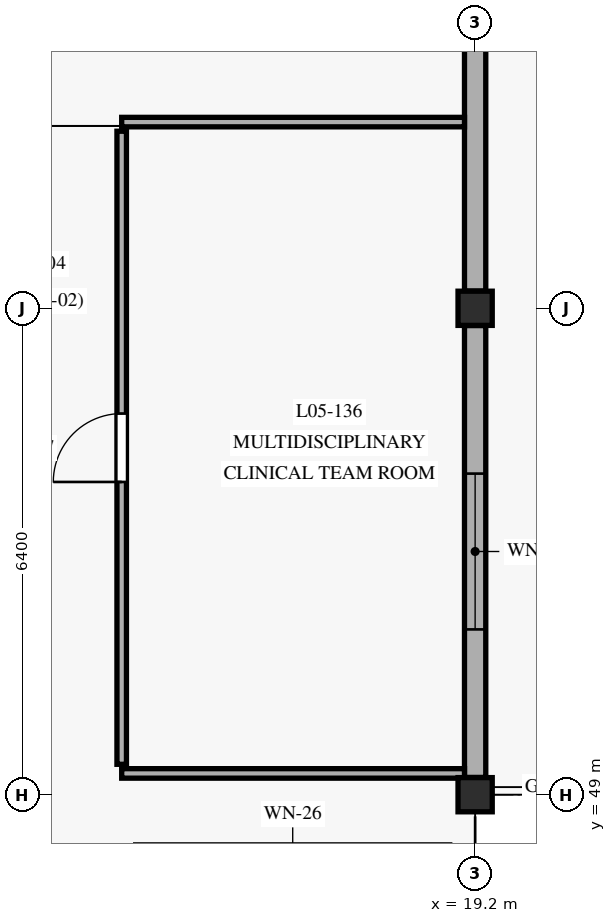
"""IFC4 building model, lengths in metres.
Left out: names, types, materials, properties, quantities, classifications, styles, units other than length and angle.
Written with IfcOpenShell. Run it as: python <this file> out.ifc"""

import sys

from ifc_helpers import new_model, si_unit, direction, frame, frame_2d, origin, origin_with_axes, origin_2d, place, context, subcontext, project, spatial, rectangle, extrude, element, fill, save


model = new_model("IFC4")
c1 = context("Model", 3, precision=1e-05, world=origin(), true_north=direction((0.0, 1.0)))
c2 = subcontext(c1, "Body", "Model", "MODEL_VIEW")
j1 = project(units=[si_unit("LENGTHUNIT", "METRE"), si_unit("PLANEANGLEUNIT", "RADIAN")], contexts=[c1])
p1 = place(None, origin())
s1 = spatial("IfcSite", under=j1, at=p1, CompositionType="ELEMENT")
p2 = place(p1, origin())
s2 = spatial("IfcBuilding", under=s1, at=p2, CompositionType="ELEMENT")
p3 = place(p2, frame((0.0, 0.0, 17.55)))
s3 = spatial("IfcBuildingStorey", under=s2, at=p3, CompositionType="ELEMENT", Elevation=17.55)
for number, where, z_axis, x_axis in (
    (1, (19.2, 49.0, 0.0), (0.0, 0.0, 1.0), (1.0, 0.0, 0.0)),
    (2, (19.2, 55.4, 0.0), (0.0, 0.0, 1.0), (1.0, 0.0, 0.0)),
):
    element("IfcColumn", number, at=place(p3, frame(where, z_axis=z_axis, x_axis=x_axis)), inside=s3, PredefinedType="COLUMN", context=c2, shape_type="SweptSolid", body=[
        extrude(rectangle(XDim=0.45, YDim=0.45, at=origin_2d()), origin(), (0.0, 0.0, 1.0), 4.05),
    ])
p4 = place(p3, frame((19.2, 49.227, 0.0), z_axis=(0.0, 0.0, 1.0), x_axis=(0.0, 1.0, 0.0)))
e3 = element("IfcWall", 3, at=p4, inside=s3, PredefinedType="SOLIDWALL", context=c2, shape_type="SweptSolid", body=[
    extrude(rectangle(XDim=5.946, YDim=0.28, at=frame_2d((2.973, 0.0))), origin(), (0.0, 0.0, 1.0), 3.39),
])
p5 = place(p4, frame((1.948, 0.0, 0.8)))
e4 = element("IfcOpeningElement", 4, at=p5, cuts=e3, PredefinedType="OPENING", context=c2, shape_type="SweptSolid", body=[
    extrude(rectangle(XDim=2.05, YDim=1.95, at=frame_2d((1.025, 0.975))), frame((0.0, 0.15, 0.0), z_axis=(0.0, -1.0, 0.0), x_axis=(1.0, 0.0, 0.0)), (0.0, 0.0, 1.0), 0.3),
])
p6 = place(p3, frame((19.2, 55.627, 0.0), z_axis=(0.0, 0.0, 1.0), x_axis=(0.0, 1.0, 0.0)))
e5 = element("IfcWall", 5, at=p6, inside=s3, PredefinedType="SOLIDWALL", context=c2, shape_type="SweptSolid", body=[
    extrude(rectangle(XDim=7.946, YDim=0.28, at=frame_2d((3.973, 0.0))), origin(), (0.0, 0.0, 1.0), 3.39),
])
p7 = place(p6, frame((3.403, 0.0, 0.0)))
e6 = element("IfcOpeningElement", 6, at=p7, cuts=e5, PredefinedType="OPENING", context=c2, shape_type="SweptSolid", body=[
    extrude(rectangle(XDim=1.14, YDim=2.3, at=frame_2d((0.57, 1.15))), frame((0.0, 0.15, 0.0), z_axis=(0.0, -1.0, 0.0), x_axis=(1.0, 0.0, 0.0)), (0.0, 0.0, 1.0), 0.3),
])
p8 = place(p3, frame((14.55, 49.4, 0.0), z_axis=(0.0, 0.0, 1.0), x_axis=(0.0, 1.0, 0.0)))
e7 = element("IfcWall", 7, at=p8, inside=s3, PredefinedType="PARTITIONING", context=c2, shape_type="SweptSolid", body=[
    extrude(rectangle(XDim=8.33, YDim=0.125, at=frame_2d((4.165, 0.0))), origin(), (0.0, 0.0, 1.0), 3.365),
])
p9 = place(p8, frame((3.715, 0.0, 0.0)))
e8 = element("IfcOpeningElement", 8, at=p9, cuts=e7, PredefinedType="OPENING", context=c2, shape_type="SweptSolid", body=[
    extrude(rectangle(XDim=0.9, YDim=2.12, at=frame_2d((0.45, 1.06))), frame((0.0, 0.073, 0.0), z_axis=(0.0, -1.0, 0.0), x_axis=(1.0, 0.0, 0.0)), (0.0, 0.0, 1.0), 0.145),
])
p10 = place(p3, frame((14.55, 49.28, 0.0), z_axis=(0.0, 0.0, 1.0), x_axis=(1.0, 0.0, 0.0)))
e9 = element("IfcWall", 9, at=p10, inside=s3, PredefinedType="PARTITIONING", context=c2, shape_type="SweptSolid", body=[
    extrude(rectangle(XDim=4.51, YDim=0.125, at=frame_2d((2.255, 0.0))), origin(), (0.0, 0.0, 1.0), 3.365),
])
p11 = place(p3, frame((14.55, 57.85, 0.0), z_axis=(0.0, 0.0, 1.0), x_axis=(1.0, 0.0, 0.0)))
e10 = element("IfcWall", 10, at=p11, inside=s3, PredefinedType="PARTITIONING", context=c2, shape_type="SweptSolid", body=[
    extrude(rectangle(XDim=4.51, YDim=0.125, at=frame_2d((2.255, 0.0))), origin(), (0.0, 0.0, 1.0), 3.385),
])
p12 = place(p5, origin_with_axes())
e11 = element("IfcWindow", 11, at=p12, inside=s3, PartitioningType="SINGLE_PANEL", PredefinedType="WINDOW", context=c2, shape_type="SweptSolid", body=[
    extrude(rectangle(XDim=2.05, YDim=1.95, at=frame_2d((1.025, 0.975))), frame((0.0, 0.03, 0.0), z_axis=(0.0, -1.0, 0.0), x_axis=(1.0, 0.0, 0.0)), (0.0, 0.0, 1.0), 0.06),
])
fill(e4, e11)
p13 = place(p9, frame((0.9, 0.0, 0.0), z_axis=(0.0, 0.0, 1.0), x_axis=(-1.0, 0.0, 0.0)))
e12 = element("IfcDoor", 12, at=p13, inside=s3, OperationType="SINGLE_SWING_RIGHT", PredefinedType="DOOR", context=c2, shape_type="SweptSolid", body=[
    extrude(rectangle(XDim=0.9, YDim=2.12, at=frame_2d((0.45, 1.06))), frame((0.0, 0.025, 0.0), z_axis=(0.0, -1.0, 0.0), x_axis=(1.0, 0.0, 0.0)), (0.0, 0.0, 1.0), 0.05),
])
fill(e8, e12)
save(model, sys.argv[1])
